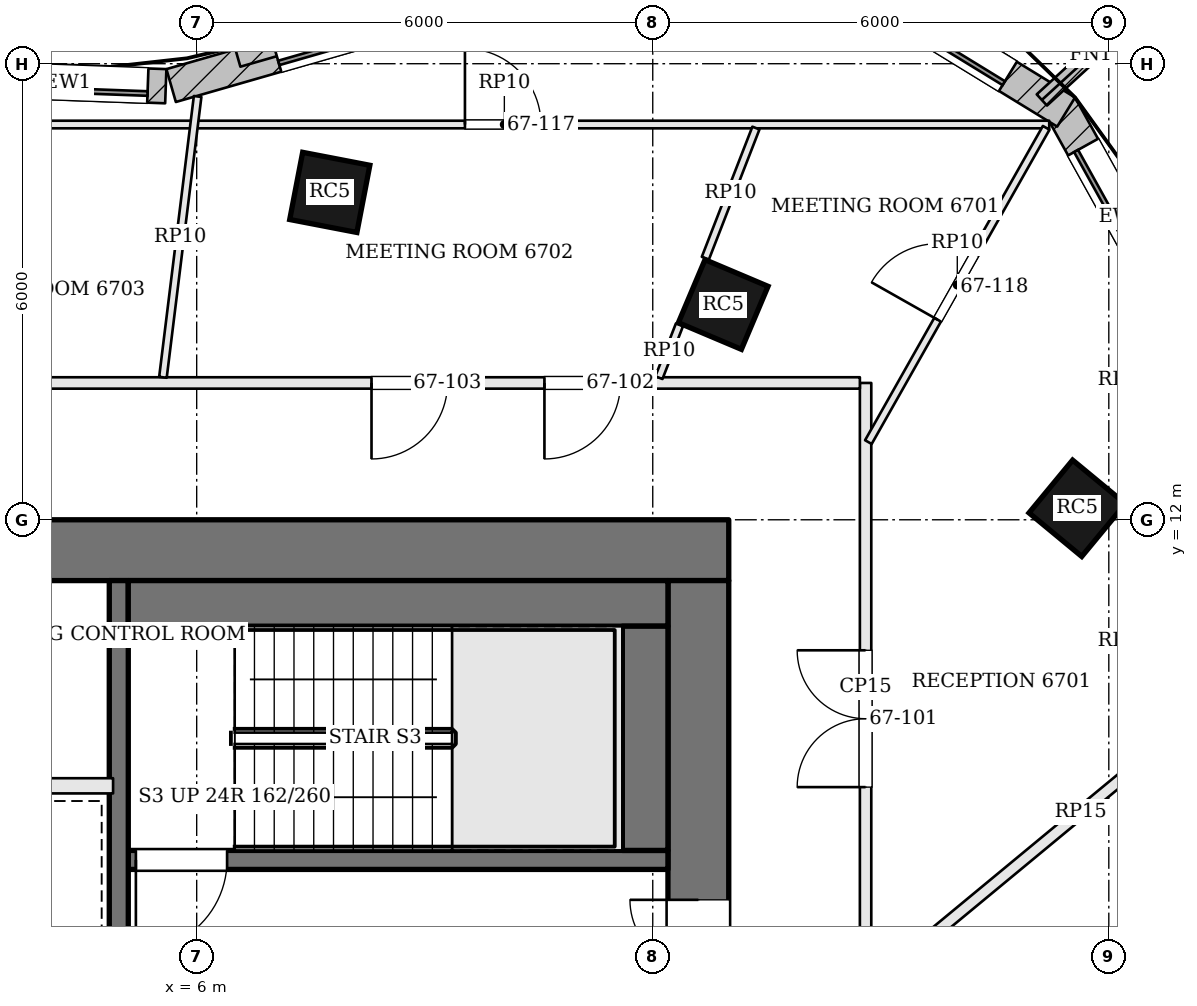
"""IFC4 building model, lengths in metres.
Left out: names, types, materials, properties, quantities, classifications, styles, units other than length and angle.
Written with IfcOpenShell. Run it as: python <this file> out.ifc"""

import sys

from ifc_helpers import new_model, si_unit, direction, frame, frame_2d, origin, origin_2d, place, context, subcontext, project, spatial, rectangle, extrude, element, fill, save


model = new_model("IFC4")
c1 = context("Model", 3, precision=1e-05, world=origin(), true_north=direction((0.0, 1.0)))
c2 = subcontext(c1, "Body", "Model", "MODEL_VIEW")
j1 = project(units=[si_unit("LENGTHUNIT", "METRE"), si_unit("PLANEANGLEUNIT", "RADIAN")], contexts=[c1])
p1 = place(None, origin())
s1 = spatial("IfcSite", under=j1, at=p1, CompositionType="ELEMENT")
p2 = place(p1, origin())
s2 = spatial("IfcBuilding", under=s1, at=p2, CompositionType="ELEMENT")
p3 = place(p2, frame((0.0, 0.0, 272.7)))
s3 = spatial("IfcBuildingStorey", under=s2, at=p3, CompositionType="ELEMENT", Elevation=272.7)
p4 = place(p3, frame((-13.0, 11.6, 0.0), z_axis=(0.0, 0.0, 1.0), x_axis=(1.0, 0.0, 0.0)))
e1 = element("IfcWall", 1, at=p4, inside=s3, PredefinedType="SHEAR", context=c2, shape_type="SweptSolid", body=[
    extrude(rectangle(XDim=26.0, YDim=0.8, at=frame_2d((13.0, 0.0))), origin(), (0.0, 0.0, 1.0), 3.9),
])
p5 = place(p4, frame((8.975, 0.0, 0.0)))
e2 = element("IfcOpeningElement", 2, at=p5, cuts=e1, PredefinedType="OPENING", context=c2, shape_type="SweptSolid", body=[
    extrude(rectangle(XDim=0.7, YDim=2.1, at=frame_2d((0.35, 1.05))), frame((0.0, 0.41, 0.0), z_axis=(0.0, -1.0, 0.0), x_axis=(1.0, 0.0, 0.0)), (0.0, 0.0, 1.0), 0.82),
])
p6 = place(p4, frame((11.025, 0.0, 0.0)))
e3 = element("IfcOpeningElement", 3, at=p6, cuts=e1, PredefinedType="OPENING", context=c2, shape_type="SweptSolid", body=[
    extrude(rectangle(XDim=0.7, YDim=2.1, at=frame_2d((0.35, 1.05))), frame((0.0, 0.41, 0.0), z_axis=(0.0, -1.0, 0.0), x_axis=(1.0, 0.0, 0.0)), (0.0, 0.0, 1.0), 0.82),
])
p7 = place(p4, frame((12.925, 0.0, 0.0)))
e4 = element("IfcOpeningElement", 4, at=p7, cuts=e1, PredefinedType="OPENING", context=c2, shape_type="SweptSolid", body=[
    extrude(rectangle(XDim=1.0, YDim=2.1, at=frame_2d((0.5, 1.05))), frame((0.0, 0.41, 0.0), z_axis=(0.0, -1.0, 0.0), x_axis=(1.0, 0.0, 0.0)), (0.0, 0.0, 1.0), 0.82),
])
p8 = place(p4, frame((15.775, 0.0, 0.0)))
e5 = element("IfcOpeningElement", 5, at=p8, cuts=e1, PredefinedType="OPENING", context=c2, shape_type="SweptSolid", body=[
    extrude(rectangle(XDim=1.0, YDim=2.1, at=frame_2d((0.5, 1.05))), frame((0.0, 0.41, 0.0), z_axis=(0.0, -1.0, 0.0), x_axis=(1.0, 0.0, 0.0)), (0.0, 0.0, 1.0), 0.82),
])
p9 = place(p3, frame((12.6, -2.2, 0.0), z_axis=(0.0, 0.0, 1.0), x_axis=(0.0, 1.0, 0.0)))
e6 = element("IfcWall", 6, at=p9, inside=s3, PredefinedType="SHEAR", context=c2, shape_type="SweptSolid", body=[
    extrude(rectangle(XDim=13.4, YDim=0.8, at=frame_2d((6.7, 0.0))), origin(), (0.0, 0.0, 1.0), 3.9),
])
p10 = place(p9, frame((7.4, 0.0, 0.0)))
e7 = element("IfcOpeningElement", 7, at=p10, cuts=e6, PredefinedType="OPENING", context=c2, shape_type="SweptSolid", body=[
    extrude(rectangle(XDim=1.8, YDim=2.1, at=frame_2d((0.9, 1.05))), frame((0.0, 0.41, 0.0), z_axis=(0.0, -1.0, 0.0), x_axis=(1.0, 0.0, 0.0)), (0.0, 0.0, 1.0), 0.82),
])
for number, where, z_axis, x_axis in (
    (8, (17.584, 12.151, 0.0), (0.0, 0.0, 1.0), (-0.771, 0.637, 0.0)),
    (9, (12.927, 14.832, 0.0), (0.0, 0.0, 1.0), (-0.921, 0.389, 0.0)),
    (10, (7.751, 16.307, 0.0), (0.0, 0.0, 1.0), (-0.982, 0.189, 0.0)),
):
    element("IfcColumn", number, at=place(p3, frame(where, z_axis=z_axis, x_axis=x_axis)), inside=s3, PredefinedType="COLUMN", context=c2, shape_type="SweptSolid", body=[
        extrude(rectangle(XDim=0.9, YDim=0.9, at=origin_2d()), origin(), (0.0, 0.0, 1.0), 3.9),
    ])
p11 = place(p3, frame((18.983, 14.523, 0.0), z_axis=(0.0, 0.0, 1.0), x_axis=(-0.485630534022, 0.874164163316, 0.0)))
e11 = element("IfcWall", 11, at=p11, inside=s3, PredefinedType="SOLIDWALL", context=c2, shape_type="SweptSolid", body=[
    extrude(rectangle(XDim=3.344, YDim=0.45, at=frame_2d((1.672, 0.0))), origin(), (0.0, 0.0, 1.0), 3.7),
])
p12 = place(p11, frame((0.622, 0.0, 0.9)))
e12 = element("IfcOpeningElement", 12, at=p12, cuts=e11, PredefinedType="OPENING", context=c2, shape_type="SweptSolid", body=[
    extrude(rectangle(XDim=2.1, YDim=2.3, at=frame_2d((1.05, 1.15))), frame((0.0, 0.235, 0.0), z_axis=(0.0, -1.0, 0.0), x_axis=(1.0, 0.0, 0.0)), (0.0, 0.0, 1.0), 0.47),
])
p13 = place(p3, frame((17.438, 17.364, 0.0), z_axis=(0.0, 0.0, 1.0), x_axis=(-0.852622865325, 0.522526793117, 0.0)))
e13 = element("IfcWall", 13, at=p13, inside=s3, PredefinedType="SOLIDWALL", context=c2, shape_type="SweptSolid", body=[
    extrude(rectangle(XDim=3.896, YDim=0.45, at=frame_2d((1.948, 0.0))), origin(), (0.0, 0.0, 1.0), 3.7),
])
p14 = place(p13, frame((0.898, 0.0, 0.9)))
e14 = element("IfcOpeningElement", 14, at=p14, cuts=e13, PredefinedType="OPENING", context=c2, shape_type="SweptSolid", body=[
    extrude(rectangle(XDim=2.1, YDim=2.3, at=frame_2d((1.05, 1.15))), frame((0.0, 0.235, 0.0), z_axis=(0.0, -1.0, 0.0), x_axis=(1.0, 0.0, 0.0)), (0.0, 0.0, 1.0), 0.47),
])
p15 = place(p3, frame((10.167, 19.007, 0.0), z_axis=(0.0, 0.0, 1.0), x_axis=(-0.961104057783, -0.276186513271, 0.0)))
e15 = element("IfcWall", 15, at=p15, inside=s3, PredefinedType="SOLIDWALL", context=c2, shape_type="SweptSolid", body=[
    extrude(rectangle(XDim=4.686, YDim=0.45, at=frame_2d((2.343, 0.0))), origin(), (0.0, 0.0, 1.0), 3.7),
])
p16 = place(p15, frame((1.443, 0.0, 0.9)))
e16 = element("IfcOpeningElement", 16, at=p16, cuts=e15, PredefinedType="OPENING", context=c2, shape_type="SweptSolid", body=[
    extrude(rectangle(XDim=1.8, YDim=2.3, at=frame_2d((0.9, 1.15))), frame((0.0, 0.235, 0.0), z_axis=(0.0, -1.0, 0.0), x_axis=(1.0, 0.0, 0.0)), (0.0, 0.0, 1.0), 0.47),
])
p17 = place(p3, frame((5.594, 17.704, 0.0), z_axis=(0.0, 0.0, 1.0), x_axis=(-0.999339560591, 0.036337895349, 0.0)))
e17 = element("IfcWall", 17, at=p17, inside=s3, PredefinedType="SOLIDWALL", context=c2, shape_type="SweptSolid", body=[
    extrude(rectangle(XDim=2.573, YDim=0.45, at=frame_2d((1.287, 0.0))), origin(), (0.0, 0.0, 1.0), 3.7),
])
p18 = place(p17, frame((0.237, 0.0, 0.9)))
e18 = element("IfcOpeningElement", 18, at=p18, cuts=e17, PredefinedType="OPENING", context=c2, shape_type="SweptSolid", body=[
    extrude(rectangle(XDim=2.1, YDim=2.3, at=frame_2d((1.05, 1.15))), frame((0.0, 0.235, 0.0), z_axis=(0.0, -1.0, 0.0), x_axis=(1.0, 0.0, 0.0)), (0.0, 0.0, 1.0), 0.47),
])
p19 = place(p3, frame((17.119, 17.523, 0.0), z_axis=(0.0, 0.0, 1.0), x_axis=(0.737866019047, 0.674947211221, 0.0)))
e19 = element("IfcWall", 19, at=p19, inside=s3, PredefinedType="SOLIDWALL", context=c2, shape_type="SweptSolid", body=[
    extrude(rectangle(XDim=1.75, YDim=0.2, at=frame_2d((0.875, 0.0))), origin(), (0.0, 0.0, 1.0), 3.7),
])
p20 = place(p3, frame((16.617, 17.955, 3.9), z_axis=(0.0, 0.0, 1.0), x_axis=(-0.852620335105, 0.522530921732, 0.0)))
e20 = element("IfcWall", 20, at=p20, inside=s3, PredefinedType="PARAPET", context=c2, shape_type="SweptSolid", body=[
    extrude(rectangle(XDim=2.758, YDim=0.3, at=frame_2d((1.379, 0.0))), origin(), (0.0, 0.0, 1.0), 1.1),
])
p21 = place(p3, frame((9.765, 19.034, 3.9), z_axis=(0.0, 0.0, 1.0), x_axis=(-0.961095330658, -0.276216881069, 0.0)))
e21 = element("IfcWall", 21, at=p21, inside=s3, PredefinedType="PARAPET", context=c2, shape_type="SweptSolid", body=[
    extrude(rectangle(XDim=3.362, YDim=0.3, at=frame_2d((1.681, 0.0))), origin(), (0.0, 0.0, 1.0), 1.1),
])
p22 = place(p3, frame((12.2, 7.525, 0.0), z_axis=(0.0, 0.0, 1.0), x_axis=(-1.0, 0.0, 0.0)))
e22 = element("IfcWall", 22, at=p22, inside=s3, PredefinedType="SOLIDWALL", context=c2, shape_type="SweptSolid", body=[
    extrude(rectangle(XDim=7.1, YDim=0.25, at=frame_2d((3.55, 0.0))), origin(), (0.0, 0.0, 1.0), 3.7),
])
p23 = place(p22, frame((5.8, 0.0, 0.0)))
e23 = element("IfcOpeningElement", 23, at=p23, cuts=e22, PredefinedType="OPENING", context=c2, shape_type="SweptSolid", body=[
    extrude(rectangle(XDim=1.2, YDim=2.1, at=frame_2d((0.6, 1.05))), frame((0.0, 0.135, 0.0), z_axis=(0.0, -1.0, 0.0), x_axis=(1.0, 0.0, 0.0)), (0.0, 0.0, 1.0), 0.27),
])
p24 = place(p3, frame((4.975, 11.2, 0.0), z_axis=(0.0, 0.0, 1.0), x_axis=(0.0, -1.0, 0.0)))
e24 = element("IfcWall", 24, at=p24, inside=s3, PredefinedType="SOLIDWALL", context=c2, shape_type="SweptSolid", body=[
    extrude(rectangle(XDim=13.4, YDim=0.25, at=frame_2d((6.7, 0.0))), origin(), (0.0, 0.0, 1.0), 3.7),
])
p25 = place(p24, frame((5.25, 0.0, 0.0)))
e25 = element("IfcOpeningElement", 25, at=p25, cuts=e24, PredefinedType="OPENING", context=c2, shape_type="SweptSolid", body=[
    extrude(rectangle(XDim=1.2, YDim=2.1, at=frame_2d((0.6, 1.05))), frame((0.0, 0.135, 0.0), z_axis=(0.0, -1.0, 0.0), x_axis=(1.0, 0.0, 0.0)), (0.0, 0.0, 1.0), 0.27),
])
p26 = place(p3, frame((12.2, 10.9, 0.0), z_axis=(0.0, 0.0, 1.0), x_axis=(-1.0, 0.0, 0.0)))
e26 = element("IfcWall", 26, at=p26, inside=s3, PredefinedType="SOLIDWALL", context=c2, shape_type="SweptSolid", body=[
    extrude(rectangle(XDim=7.1, YDim=0.6, at=frame_2d((3.55, 0.0))), origin(), (0.0, 0.0, 1.0), 3.7),
])
p27 = place(p3, frame((11.9, 10.6, 0.0), z_axis=(0.0, 0.0, 1.0), x_axis=(0.0, -1.0, 0.0)))
e27 = element("IfcWall", 27, at=p27, inside=s3, PredefinedType="SOLIDWALL", context=c2, shape_type="SweptSolid", body=[
    extrude(rectangle(XDim=2.95, YDim=0.6, at=frame_2d((1.475, 0.0))), origin(), (0.0, 0.0, 1.0), 3.7),
])
p28 = place(p3, frame((-4.9, 8.5, 0.0), z_axis=(0.0, 0.0, 1.0), x_axis=(1.0, 0.0, 0.0)))
e28 = element("IfcWall", 28, at=p28, inside=s3, PredefinedType="SOLIDWALL", context=c2, shape_type="SweptSolid", body=[
    extrude(rectangle(XDim=9.8, YDim=0.2, at=frame_2d((4.9, 0.0))), origin(), (0.0, 0.0, 1.0), 3.7),
])
p29 = place(p3, frame((14.8, 5.809, 0.0), z_axis=(0.0, 0.0, 1.0), x_axis=(0.0, 1.0, 0.0)))
e29 = element("IfcWall", 29, at=p29, inside=s3, PredefinedType="PARTITIONING", context=c2, shape_type="SweptSolid", body=[
    extrude(rectangle(XDim=7.991, YDim=0.15, at=frame_2d((3.996, 0.0))), origin(), (0.0, 0.0, 1.0), 3.198),
])
p30 = place(p29, frame((2.674, 0.0, 0.0)))
e30 = element("IfcOpeningElement", 30, at=p30, cuts=e29, PredefinedType="OPENING", context=c2, shape_type="SweptSolid", body=[
    extrude(rectangle(XDim=1.8, YDim=2.1, at=frame_2d((0.9, 1.05))), frame((0.0, 0.085, 0.0), z_axis=(0.0, -1.0, 0.0), x_axis=(1.0, 0.0, 0.0)), (0.0, 0.0, 1.0), 0.17),
])
p31 = place(p3, frame((14.725, 13.8, 0.0), z_axis=(0.0, 0.0, 1.0), x_axis=(-1.0, 0.0, 0.0)))
e31 = element("IfcWall", 31, at=p31, inside=s3, PredefinedType="PARTITIONING", context=c2, shape_type="SweptSolid", body=[
    extrude(rectangle(XDim=23.281, YDim=0.15, at=frame_2d((11.64, 0.0))), origin(), (0.0, 0.0, 1.0), 3.198),
])
p32 = place(p31, frame((3.15, 0.0, 0.0)))
e32 = element("IfcOpeningElement", 32, at=p32, cuts=e31, PredefinedType="OPENING", context=c2, shape_type="SweptSolid", body=[
    extrude(rectangle(XDim=1.0, YDim=2.4, at=frame_2d((0.5, 1.2))), frame((0.0, 0.085, 0.0), z_axis=(0.0, -1.0, 0.0), x_axis=(1.0, 0.0, 0.0)), (0.0, 0.0, 1.0), 0.17),
])
p33 = place(p31, frame((5.425, 0.0, 0.0)))
e33 = element("IfcOpeningElement", 33, at=p33, cuts=e31, PredefinedType="OPENING", context=c2, shape_type="SweptSolid", body=[
    extrude(rectangle(XDim=1.0, YDim=2.4, at=frame_2d((0.5, 1.2))), frame((0.0, 0.085, 0.0), z_axis=(0.0, -1.0, 0.0), x_axis=(1.0, 0.0, 0.0)), (0.0, 0.0, 1.0), 0.17),
])
p34 = place(p31, frame((11.558, 0.0, 0.0)))
e34 = element("IfcOpeningElement", 34, at=p34, cuts=e31, PredefinedType="OPENING", context=c2, shape_type="SweptSolid", body=[
    extrude(rectangle(XDim=1.0, YDim=2.4, at=frame_2d((0.5, 1.2))), frame((0.0, 0.085, 0.0), z_axis=(0.0, -1.0, 0.0), x_axis=(1.0, 0.0, 0.0)), (0.0, 0.0, 1.0), 0.17),
])
p35 = place(p31, frame((15.95, 0.0, 0.0)))
e35 = element("IfcOpeningElement", 35, at=p35, cuts=e31, PredefinedType="OPENING", context=c2, shape_type="SweptSolid", body=[
    extrude(rectangle(XDim=0.9, YDim=2.1, at=frame_2d((0.45, 1.05))), frame((0.0, 0.085, 0.0), z_axis=(0.0, -1.0, 0.0), x_axis=(1.0, 0.0, 0.0)), (0.0, 0.0, 1.0), 0.17),
])
p36 = place(p31, frame((19.95, 0.0, 0.0)))
e36 = element("IfcOpeningElement", 36, at=p36, cuts=e31, PredefinedType="OPENING", context=c2, shape_type="SweptSolid", body=[
    extrude(rectangle(XDim=1.0, YDim=2.1, at=frame_2d((0.5, 1.05))), frame((0.0, 0.085, 0.0), z_axis=(0.0, -1.0, 0.0), x_axis=(1.0, 0.0, 0.0)), (0.0, 0.0, 1.0), 0.17),
])
p37 = place(p3, frame((20.403, 10.442, 0.0), z_axis=(0.0, 0.0, 1.0), x_axis=(-0.770613226955, -0.637303110334, 0.0)))
e37 = element("IfcWall", 37, at=p37, inside=s3, PredefinedType="PARTITIONING", context=c2, shape_type="SweptSolid", body=[
    extrude(rectangle(XDim=7.196, YDim=0.15, at=frame_2d((3.598, 0.0))), origin(), (0.0, 0.0, 1.0), 3.198),
])
p38 = place(p3, frame((2.879, 17.2, 0.0), z_axis=(0.0, 0.0, 1.0), x_axis=(1.0, 0.0, 0.0)))
e38 = element("IfcWall", 38, at=p38, inside=s3, PredefinedType="PARTITIONING", context=c2, shape_type="SweptSolid", body=[
    extrude(rectangle(XDim=14.337, YDim=0.1, at=frame_2d((7.168, 0.0))), origin(), (0.0, 0.0, 1.0), 3.184),
])
p39 = place(p38, frame((6.65, 0.0, 0.0)))
e39 = element("IfcOpeningElement", 39, at=p39, cuts=e38, PredefinedType="OPENING", context=c2, shape_type="SweptSolid", body=[
    extrude(rectangle(XDim=1.0, YDim=2.4, at=frame_2d((0.5, 1.2))), frame((0.0, 0.06, 0.0), z_axis=(0.0, -1.0, 0.0), x_axis=(1.0, 0.0, 0.0)), (0.0, 0.0, 1.0), 0.12),
])
p40 = place(p3, frame((14.837, 13.022, 0.0), z_axis=(0.0, 0.0, 1.0), x_axis=(0.492409466631, 0.870363669492, 0.0)))
e40 = element("IfcWall", 40, at=p40, inside=s3, PredefinedType="PARTITIONING", context=c2, shape_type="SweptSolid", body=[
    extrude(rectangle(XDim=4.75, YDim=0.1, at=frame_2d((2.375, 0.0))), origin(), (0.0, 0.0, 1.0), 3.184),
])
p41 = place(p40, frame((1.85, 0.0, 0.0)))
e41 = element("IfcOpeningElement", 41, at=p41, cuts=e40, PredefinedType="OPENING", context=c2, shape_type="SweptSolid", body=[
    extrude(rectangle(XDim=1.0, YDim=2.4, at=frame_2d((0.5, 1.2))), frame((0.0, 0.06, 0.0), z_axis=(0.0, -1.0, 0.0), x_axis=(1.0, 0.0, 0.0)), (0.0, 0.0, 1.0), 0.12),
])
p42 = place(p3, frame((12.081, 13.87, 0.0), z_axis=(0.0, 0.0, 1.0), x_axis=(0.362114440247, 0.932133645013, 0.0)))
e42 = element("IfcWall", 42, at=p42, inside=s3, PredefinedType="PARTITIONING", context=c2, shape_type="SweptSolid", body=[
    extrude(rectangle(XDim=0.746, YDim=0.1, at=frame_2d((0.373, 0.0))), origin(), (0.0, 0.0, 1.0), 3.184),
])
p43 = place(p3, frame((12.692, 15.441, 0.0), z_axis=(0.0, 0.0, 1.0), x_axis=(0.362298742871, 0.932062026323, 0.0)))
e43 = element("IfcWall", 43, at=p43, inside=s3, PredefinedType="PARTITIONING", context=c2, shape_type="SweptSolid", body=[
    extrude(rectangle(XDim=1.837, YDim=0.1, at=frame_2d((0.918, 0.0))), origin(), (0.0, 0.0, 1.0), 3.184),
])
p44 = place(p3, frame((5.556, 13.875, 0.0), z_axis=(0.0, 0.0, 1.0), x_axis=(0.122573624649, 0.99245942312, 0.0)))
e44 = element("IfcWall", 44, at=p44, inside=s3, PredefinedType="PARTITIONING", context=c2, shape_type="SweptSolid", body=[
    extrude(rectangle(XDim=3.723, YDim=0.1, at=frame_2d((1.861, 0.0))), origin(), (0.0, 0.0, 1.0), 3.184),
])
p45 = place(p12, origin())
e45 = element("IfcWindow", 45, at=p45, inside=s3, PartitioningType="SINGLE_PANEL", PredefinedType="WINDOW", context=c2, shape_type="SweptSolid", body=[
    extrude(rectangle(XDim=2.1, YDim=2.3, at=frame_2d((1.05, 1.15))), frame((0.0, 0.135, 0.0), z_axis=(0.0, -1.0, 0.0), x_axis=(1.0, 0.0, 0.0)), (0.0, 0.0, 1.0), 0.06),
])
fill(e12, e45)
p46 = place(p14, origin())
e46 = element("IfcWindow", 46, at=p46, inside=s3, PartitioningType="SINGLE_PANEL", PredefinedType="WINDOW", context=c2, shape_type="SweptSolid", body=[
    extrude(rectangle(XDim=2.1, YDim=2.3, at=frame_2d((1.05, 1.15))), frame((0.0, 0.135, 0.0), z_axis=(0.0, -1.0, 0.0), x_axis=(1.0, 0.0, 0.0)), (0.0, 0.0, 1.0), 0.06),
])
fill(e14, e46)
p47 = place(p16, origin())
e47 = element("IfcWindow", 47, at=p47, inside=s3, PartitioningType="SINGLE_PANEL", PredefinedType="WINDOW", context=c2, shape_type="SweptSolid", body=[
    extrude(rectangle(XDim=1.8, YDim=2.3, at=frame_2d((0.9, 1.15))), frame((0.0, 0.135, 0.0), z_axis=(0.0, -1.0, 0.0), x_axis=(1.0, 0.0, 0.0)), (0.0, 0.0, 1.0), 0.06),
])
fill(e16, e47)
p48 = place(p18, origin())
e48 = element("IfcWindow", 48, at=p48, inside=s3, PartitioningType="SINGLE_PANEL", PredefinedType="WINDOW", context=c2, shape_type="SweptSolid", body=[
    extrude(rectangle(XDim=2.1, YDim=2.3, at=frame_2d((1.05, 1.15))), frame((0.0, 0.135, 0.0), z_axis=(0.0, -1.0, 0.0), x_axis=(1.0, 0.0, 0.0)), (0.0, 0.0, 1.0), 0.06),
])
fill(e18, e48)
p49 = place(p10, origin())
e49 = element("IfcDoor", 49, at=p49, inside=s3, OperationType="DOUBLE_DOOR_SINGLE_SWING", PredefinedType="DOOR", context=c2, shape_type="SweptSolid", body=[
    extrude(rectangle(XDim=1.8, YDim=2.1, at=frame_2d((0.9, 1.05))), frame((0.0, 0.025, 0.0), z_axis=(0.0, -1.0, 0.0), x_axis=(1.0, 0.0, 0.0)), (0.0, 0.0, 1.0), 0.05),
])
fill(e7, e49)
p50 = place(p23, origin())
e50 = element("IfcDoor", 50, at=p50, inside=s3, OperationType="SINGLE_SWING_RIGHT", PredefinedType="DOOR", context=c2, shape_type="SweptSolid", body=[
    extrude(rectangle(XDim=1.2, YDim=2.1, at=frame_2d((0.6, 1.05))), frame((0.0, 0.025, 0.0), z_axis=(0.0, -1.0, 0.0), x_axis=(1.0, 0.0, 0.0)), (0.0, 0.0, 1.0), 0.05),
])
fill(e23, e50)
p51 = place(p30, origin())
e51 = element("IfcDoor", 51, at=p51, inside=s3, OperationType="DOUBLE_DOOR_SINGLE_SWING", PredefinedType="DOOR", context=c2, shape_type="SweptSolid", body=[
    extrude(rectangle(XDim=1.8, YDim=2.1, at=frame_2d((0.9, 1.05))), frame((0.0, 0.025, 0.0), z_axis=(0.0, -1.0, 0.0), x_axis=(1.0, 0.0, 0.0)), (0.0, 0.0, 1.0), 0.05),
])
fill(e30, e51)
p52 = place(p32, origin())
e52 = element("IfcDoor", 52, at=p52, inside=s3, OperationType="SINGLE_SWING_RIGHT", PredefinedType="DOOR", context=c2, shape_type="SweptSolid", body=[
    extrude(rectangle(XDim=1.0, YDim=2.4, at=frame_2d((0.5, 1.2))), frame((0.0, 0.025, 0.0), z_axis=(0.0, -1.0, 0.0), x_axis=(1.0, 0.0, 0.0)), (0.0, 0.0, 1.0), 0.05),
])
fill(e32, e52)
p53 = place(p33, origin())
e53 = element("IfcDoor", 53, at=p53, inside=s3, OperationType="SINGLE_SWING_RIGHT", PredefinedType="DOOR", context=c2, shape_type="SweptSolid", body=[
    extrude(rectangle(XDim=1.0, YDim=2.4, at=frame_2d((0.5, 1.2))), frame((0.0, 0.025, 0.0), z_axis=(0.0, -1.0, 0.0), x_axis=(1.0, 0.0, 0.0)), (0.0, 0.0, 1.0), 0.05),
])
fill(e33, e53)
p54 = place(p39, origin())
e54 = element("IfcDoor", 54, at=p54, inside=s3, OperationType="SINGLE_SWING_LEFT", PredefinedType="DOOR", context=c2, shape_type="SweptSolid", body=[
    extrude(rectangle(XDim=1.0, YDim=2.4, at=frame_2d((0.5, 1.2))), frame((0.0, 0.025, 0.0), z_axis=(0.0, -1.0, 0.0), x_axis=(1.0, 0.0, 0.0)), (0.0, 0.0, 1.0), 0.05),
])
fill(e39, e54)
p55 = place(p41, origin())
e55 = element("IfcDoor", 55, at=p55, inside=s3, OperationType="SINGLE_SWING_LEFT", PredefinedType="DOOR", context=c2, shape_type="SweptSolid", body=[
    extrude(rectangle(XDim=1.0, YDim=2.4, at=frame_2d((0.5, 1.2))), frame((0.0, 0.025, 0.0), z_axis=(0.0, -1.0, 0.0), x_axis=(1.0, 0.0, 0.0)), (0.0, 0.0, 1.0), 0.05),
])
fill(e41, e55)
save(model, sys.argv[1])
